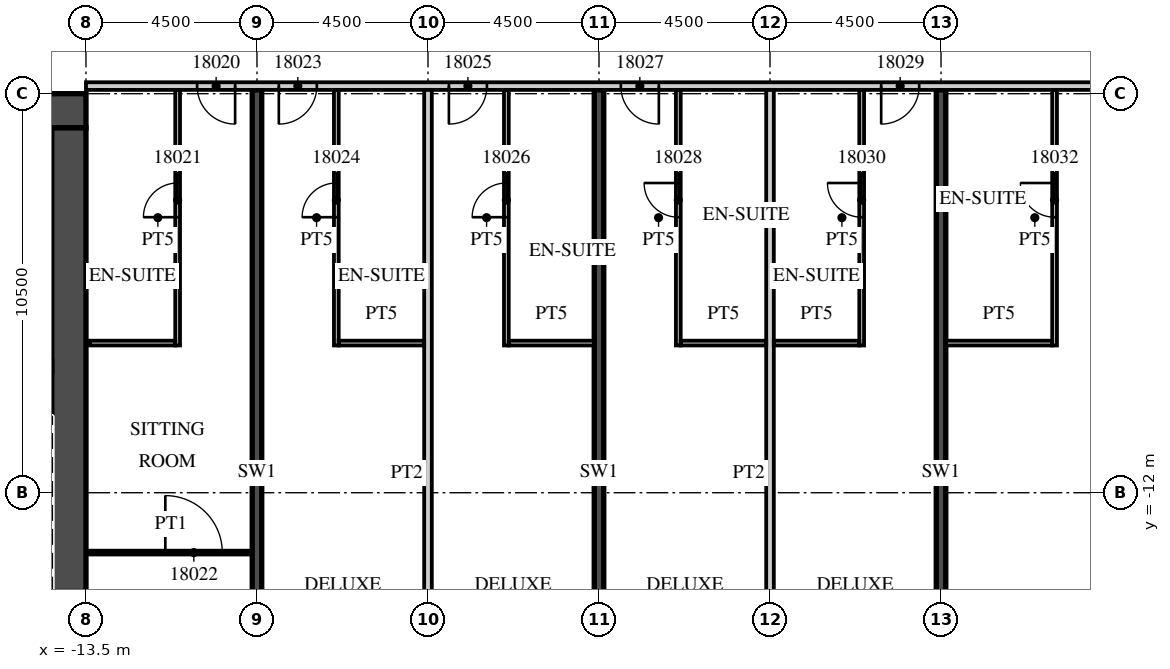
"""IFC4 building model, lengths in metres.
Left out: names, types, materials, properties, quantities, classifications, styles, units other than length and angle.
Written with IfcOpenShell. Run it as: python <this file> out.ifc"""

import sys

from ifc_helpers import new_model, si_unit, direction, frame, frame_2d, origin, place, context, subcontext, project, spatial, rectangle, extrude, element, fill, save


model = new_model("IFC4")
c1 = context("Model", 3, precision=1e-05, world=origin(), true_north=direction((0.0, 1.0)))
c2 = subcontext(c1, "Body", "Model", "MODEL_VIEW")
j1 = project(units=[si_unit("LENGTHUNIT", "METRE"), si_unit("PLANEANGLEUNIT", "RADIAN")], contexts=[c1])
p1 = place(None, origin())
s1 = spatial("IfcSite", under=j1, at=p1, CompositionType="ELEMENT")
p2 = place(p1, origin())
s2 = spatial("IfcBuilding", under=s1, at=p2, CompositionType="ELEMENT")
p3 = place(p2, frame((0.0, 0.0, 89.7)))
s3 = spatial("IfcBuildingStorey", under=s2, at=p3, CompositionType="ELEMENT", Elevation=89.7)
for number, where, z_axis, x_axis in (
    (1, (-9.0, -21.54, 0.0), (0.0, 0.0, 1.0), (0.0, 1.0, 0.0)),
    (2, (0.0, -21.54, 0.0), (0.0, 0.0, 1.0), (0.0, 1.0, 0.0)),
    (3, (9.0, -21.54, 0.0), (0.0, 0.0, 1.0), (0.0, 1.0, 0.0)),
):
    element("IfcWall", number, at=place(p3, frame(where, z_axis=z_axis, x_axis=x_axis)), inside=s3, PredefinedType="SHEAR", context=c2, shape_type="SweptSolid", body=[
        extrude(rectangle(XDim=20.14, YDim=0.25, at=frame_2d((10.07, 0.0))), origin(), (0.0, 0.0, 1.0), 3.3),
    ])
p4 = place(p3, frame((-13.5, -1.3, 0.0), z_axis=(0.0, 0.0, 1.0), x_axis=(1.0, 0.0, 0.0)))
e4 = element("IfcWall", 4, at=p4, inside=s3, PredefinedType="PARTITIONING", context=c2, shape_type="SweptSolid", body=[
    extrude(rectangle(XDim=58.05, YDim=0.2, at=frame_2d((29.025, 0.0))), origin(), (0.0, 0.0, 1.0), 3.02),
])
p5 = place(p4, frame((2.925, 0.0, 0.0)))
e5 = element("IfcOpeningElement", 5, at=p5, cuts=e4, PredefinedType="OPENING", context=c2, shape_type="SweptSolid", body=[
    extrude(rectangle(XDim=1.0, YDim=2.1, at=frame_2d((0.5, 1.05))), frame((0.0, 0.11, 0.0), z_axis=(0.0, -1.0, 0.0), x_axis=(1.0, 0.0, 0.0)), (0.0, 0.0, 1.0), 0.22),
])
p6 = place(p4, frame((5.075, 0.0, 0.0)))
e6 = element("IfcOpeningElement", 6, at=p6, cuts=e4, PredefinedType="OPENING", context=c2, shape_type="SweptSolid", body=[
    extrude(rectangle(XDim=1.0, YDim=2.1, at=frame_2d((0.5, 1.05))), frame((0.0, 0.11, 0.0), z_axis=(0.0, -1.0, 0.0), x_axis=(1.0, 0.0, 0.0)), (0.0, 0.0, 1.0), 0.22),
])
p7 = place(p4, frame((9.55, 0.0, 0.0)))
e7 = element("IfcOpeningElement", 7, at=p7, cuts=e4, PredefinedType="OPENING", context=c2, shape_type="SweptSolid", body=[
    extrude(rectangle(XDim=1.0, YDim=2.1, at=frame_2d((0.5, 1.05))), frame((0.0, 0.11, 0.0), z_axis=(0.0, -1.0, 0.0), x_axis=(1.0, 0.0, 0.0)), (0.0, 0.0, 1.0), 0.22),
])
p8 = place(p4, frame((14.075, 0.0, 0.0)))
e8 = element("IfcOpeningElement", 8, at=p8, cuts=e4, PredefinedType="OPENING", context=c2, shape_type="SweptSolid", body=[
    extrude(rectangle(XDim=1.0, YDim=2.1, at=frame_2d((0.5, 1.05))), frame((0.0, 0.11, 0.0), z_axis=(0.0, -1.0, 0.0), x_axis=(1.0, 0.0, 0.0)), (0.0, 0.0, 1.0), 0.22),
])
p9 = place(p4, frame((20.925, 0.0, 0.0)))
e9 = element("IfcOpeningElement", 9, at=p9, cuts=e4, PredefinedType="OPENING", context=c2, shape_type="SweptSolid", body=[
    extrude(rectangle(XDim=1.0, YDim=2.1, at=frame_2d((0.5, 1.05))), frame((0.0, 0.11, 0.0), z_axis=(0.0, -1.0, 0.0), x_axis=(1.0, 0.0, 0.0)), (0.0, 0.0, 1.0), 0.22),
])
p10 = place(p4, frame((27.862, 0.0, 0.0)))
e10 = element("IfcOpeningElement", 10, at=p10, cuts=e4, PredefinedType="OPENING", context=c2, shape_type="SweptSolid", body=[
    extrude(rectangle(XDim=1.2, YDim=2.1, at=frame_2d((0.6, 1.05))), frame((0.0, 0.11, 0.0), z_axis=(0.0, -1.0, 0.0), x_axis=(1.0, 0.0, 0.0)), (0.0, 0.0, 1.0), 0.22),
])
p11 = place(p4, frame((34.45, 0.0, 0.0)))
e11 = element("IfcOpeningElement", 11, at=p11, cuts=e4, PredefinedType="OPENING", context=c2, shape_type="SweptSolid", body=[
    extrude(rectangle(XDim=1.0, YDim=2.1, at=frame_2d((0.5, 1.05))), frame((0.0, 0.11, 0.0), z_axis=(0.0, -1.0, 0.0), x_axis=(1.0, 0.0, 0.0)), (0.0, 0.0, 1.0), 0.22),
])
p12 = place(p4, frame((38.925, 0.0, 0.0)))
e12 = element("IfcOpeningElement", 12, at=p12, cuts=e4, PredefinedType="OPENING", context=c2, shape_type="SweptSolid", body=[
    extrude(rectangle(XDim=1.0, YDim=2.1, at=frame_2d((0.5, 1.05))), frame((0.0, 0.11, 0.0), z_axis=(0.0, -1.0, 0.0), x_axis=(1.0, 0.0, 0.0)), (0.0, 0.0, 1.0), 0.22),
])
p13 = place(p4, frame((41.075, 0.0, 0.0)))
e13 = element("IfcOpeningElement", 13, at=p13, cuts=e4, PredefinedType="OPENING", context=c2, shape_type="SweptSolid", body=[
    extrude(rectangle(XDim=1.0, YDim=2.1, at=frame_2d((0.5, 1.05))), frame((0.0, 0.11, 0.0), z_axis=(0.0, -1.0, 0.0), x_axis=(1.0, 0.0, 0.0)), (0.0, 0.0, 1.0), 0.22),
])
p14 = place(p4, frame((45.55, 0.0, 0.0)))
e14 = element("IfcOpeningElement", 14, at=p14, cuts=e4, PredefinedType="OPENING", context=c2, shape_type="SweptSolid", body=[
    extrude(rectangle(XDim=1.0, YDim=2.1, at=frame_2d((0.5, 1.05))), frame((0.0, 0.11, 0.0), z_axis=(0.0, -1.0, 0.0), x_axis=(1.0, 0.0, 0.0)), (0.0, 0.0, 1.0), 0.22),
])
p15 = place(p4, frame((50.075, 0.0, 0.0)))
e15 = element("IfcOpeningElement", 15, at=p15, cuts=e4, PredefinedType="OPENING", context=c2, shape_type="SweptSolid", body=[
    extrude(rectangle(XDim=1.0, YDim=2.1, at=frame_2d((0.5, 1.05))), frame((0.0, 0.11, 0.0), z_axis=(0.0, -1.0, 0.0), x_axis=(1.0, 0.0, 0.0)), (0.0, 0.0, 1.0), 0.22),
])
p16 = place(p4, frame((56.525, 0.0, 0.0)))
e16 = element("IfcOpeningElement", 16, at=p16, cuts=e4, PredefinedType="OPENING", context=c2, shape_type="SweptSolid", body=[
    extrude(rectangle(XDim=1.0, YDim=2.1, at=frame_2d((0.5, 1.05))), frame((0.0, 0.11, 0.0), z_axis=(0.0, -1.0, 0.0), x_axis=(1.0, 0.0, 0.0)), (0.0, 0.0, 1.0), 0.22),
])
p17 = place(p3, frame((-11.088, -8.125, 0.0), z_axis=(0.0, 0.0, 1.0), x_axis=(0.0, 1.0, 0.0)))
e17 = element("IfcWall", 17, at=p17, inside=s3, PredefinedType="PARTITIONING", context=c2, shape_type="SweptSolid", body=[
    extrude(rectangle(XDim=6.725, YDim=0.125, at=frame_2d((3.363, 0.0))), origin(), (0.0, 0.0, 1.0), 3.02),
])
p18 = place(p17, frame((3.375, 0.0, 0.0)))
e18 = element("IfcOpeningElement", 18, at=p18, cuts=e17, PredefinedType="OPENING", context=c2, shape_type="SweptSolid", body=[
    extrude(rectangle(XDim=0.9, YDim=2.1, at=frame_2d((0.45, 1.05))), frame((0.0, 0.073, 0.0), z_axis=(0.0, -1.0, 0.0), x_axis=(1.0, 0.0, 0.0)), (0.0, 0.0, 1.0), 0.145),
])
p19 = place(p3, frame((-13.4, -8.062, 0.0), z_axis=(0.0, 0.0, 1.0), x_axis=(1.0, 0.0, 0.0)))
e19 = element("IfcWall", 19, at=p19, inside=s3, PredefinedType="PARTITIONING", context=c2, shape_type="SweptSolid", body=[
    extrude(rectangle(XDim=2.25, YDim=0.125, at=frame_2d((1.125, 0.0))), origin(), (0.0, 0.0, 1.0), 3.02),
])
p20 = place(p3, frame((-13.4, -13.575, 0.0), z_axis=(0.0, 0.0, 1.0), x_axis=(1.0, 0.0, 0.0)))
e20 = element("IfcWall", 20, at=p20, inside=s3, PredefinedType="PARTITIONING", context=c2, shape_type="SweptSolid", body=[
    extrude(rectangle(XDim=4.275, YDim=0.1, at=frame_2d((2.137, 0.0))), origin(), (0.0, 0.0, 1.0), 3.02),
])
p21 = place(p20, frame((1.988, 0.0, 0.0)))
e21 = element("IfcOpeningElement", 21, at=p21, cuts=e20, PredefinedType="OPENING", context=c2, shape_type="SweptSolid", body=[
    extrude(rectangle(XDim=1.5, YDim=2.1, at=frame_2d((0.75, 1.05))), frame((0.0, 0.06, 0.0), z_axis=(0.0, -1.0, 0.0), x_axis=(1.0, 0.0, 0.0)), (0.0, 0.0, 1.0), 0.12),
])
p22 = place(p3, frame((-4.5, -21.55, 0.0), z_axis=(0.0, 0.0, 1.0), x_axis=(0.0, 1.0, 0.0)))
e22 = element("IfcWall", 22, at=p22, inside=s3, PredefinedType="PARTITIONING", context=c2, shape_type="SweptSolid", body=[
    extrude(rectangle(XDim=20.15, YDim=0.2, at=frame_2d((10.075, 0.0))), origin(), (0.0, 0.0, 1.0), 3.02),
])
p23 = place(p3, frame((-6.912, -8.125, 0.0), z_axis=(0.0, 0.0, 1.0), x_axis=(0.0, 1.0, 0.0)))
e23 = element("IfcWall", 23, at=p23, inside=s3, PredefinedType="PARTITIONING", context=c2, shape_type="SweptSolid", body=[
    extrude(rectangle(XDim=6.725, YDim=0.125, at=frame_2d((3.363, 0.0))), origin(), (0.0, 0.0, 1.0), 3.02),
])
p24 = place(p23, frame((3.375, 0.0, 0.0)))
e24 = element("IfcOpeningElement", 24, at=p24, cuts=e23, PredefinedType="OPENING", context=c2, shape_type="SweptSolid", body=[
    extrude(rectangle(XDim=0.9, YDim=2.1, at=frame_2d((0.45, 1.05))), frame((0.0, 0.073, 0.0), z_axis=(0.0, -1.0, 0.0), x_axis=(1.0, 0.0, 0.0)), (0.0, 0.0, 1.0), 0.145),
])
p25 = place(p3, frame((-6.85, -8.062, 0.0), z_axis=(0.0, 0.0, 1.0), x_axis=(1.0, 0.0, 0.0)))
e25 = element("IfcWall", 25, at=p25, inside=s3, PredefinedType="PARTITIONING", context=c2, shape_type="SweptSolid", body=[
    extrude(rectangle(XDim=2.25, YDim=0.125, at=frame_2d((1.125, 0.0))), origin(), (0.0, 0.0, 1.0), 3.02),
])
p26 = place(p3, frame((-2.438, -8.125, 0.0), z_axis=(0.0, 0.0, 1.0), x_axis=(0.0, 1.0, 0.0)))
e26 = element("IfcWall", 26, at=p26, inside=s3, PredefinedType="PARTITIONING", context=c2, shape_type="SweptSolid", body=[
    extrude(rectangle(XDim=6.725, YDim=0.125, at=frame_2d((3.363, 0.0))), origin(), (0.0, 0.0, 1.0), 3.02),
])
p27 = place(p26, frame((3.375, 0.0, 0.0)))
e27 = element("IfcOpeningElement", 27, at=p27, cuts=e26, PredefinedType="OPENING", context=c2, shape_type="SweptSolid", body=[
    extrude(rectangle(XDim=0.9, YDim=2.1, at=frame_2d((0.45, 1.05))), frame((0.0, 0.073, 0.0), z_axis=(0.0, -1.0, 0.0), x_axis=(1.0, 0.0, 0.0)), (0.0, 0.0, 1.0), 0.145),
])
p28 = place(p3, frame((-2.375, -8.062, 0.0), z_axis=(0.0, 0.0, 1.0), x_axis=(1.0, 0.0, 0.0)))
e28 = element("IfcWall", 28, at=p28, inside=s3, PredefinedType="PARTITIONING", context=c2, shape_type="SweptSolid", body=[
    extrude(rectangle(XDim=2.25, YDim=0.125, at=frame_2d((1.125, 0.0))), origin(), (0.0, 0.0, 1.0), 3.02),
])
p29 = place(p3, frame((4.5, -21.55, 0.0), z_axis=(0.0, 0.0, 1.0), x_axis=(0.0, 1.0, 0.0)))
e29 = element("IfcWall", 29, at=p29, inside=s3, PredefinedType="PARTITIONING", context=c2, shape_type="SweptSolid", body=[
    extrude(rectangle(XDim=20.15, YDim=0.2, at=frame_2d((10.075, 0.0))), origin(), (0.0, 0.0, 1.0), 3.02),
])
p30 = place(p3, frame((2.087, -8.125, 0.0), z_axis=(0.0, 0.0, 1.0), x_axis=(0.0, 1.0, 0.0)))
e30 = element("IfcWall", 30, at=p30, inside=s3, PredefinedType="PARTITIONING", context=c2, shape_type="SweptSolid", body=[
    extrude(rectangle(XDim=6.725, YDim=0.125, at=frame_2d((3.363, 0.0))), origin(), (0.0, 0.0, 1.0), 3.02),
])
p31 = place(p30, frame((3.375, 0.0, 0.0)))
e31 = element("IfcOpeningElement", 31, at=p31, cuts=e30, PredefinedType="OPENING", context=c2, shape_type="SweptSolid", body=[
    extrude(rectangle(XDim=0.9, YDim=2.1, at=frame_2d((0.45, 1.05))), frame((0.0, 0.073, 0.0), z_axis=(0.0, -1.0, 0.0), x_axis=(1.0, 0.0, 0.0)), (0.0, 0.0, 1.0), 0.145),
])
p32 = place(p3, frame((2.15, -8.062, 0.0), z_axis=(0.0, 0.0, 1.0), x_axis=(1.0, 0.0, 0.0)))
e32 = element("IfcWall", 32, at=p32, inside=s3, PredefinedType="PARTITIONING", context=c2, shape_type="SweptSolid", body=[
    extrude(rectangle(XDim=2.25, YDim=0.125, at=frame_2d((1.125, 0.0))), origin(), (0.0, 0.0, 1.0), 3.02),
])
p33 = place(p3, frame((6.912, -8.125, 0.0), z_axis=(0.0, 0.0, 1.0), x_axis=(0.0, 1.0, 0.0)))
e33 = element("IfcWall", 33, at=p33, inside=s3, PredefinedType="PARTITIONING", context=c2, shape_type="SweptSolid", body=[
    extrude(rectangle(XDim=6.725, YDim=0.125, at=frame_2d((3.363, 0.0))), origin(), (0.0, 0.0, 1.0), 3.02),
])
p34 = place(p33, frame((3.375, 0.0, 0.0)))
e34 = element("IfcOpeningElement", 34, at=p34, cuts=e33, PredefinedType="OPENING", context=c2, shape_type="SweptSolid", body=[
    extrude(rectangle(XDim=0.9, YDim=2.1, at=frame_2d((0.45, 1.05))), frame((0.0, 0.073, 0.0), z_axis=(0.0, -1.0, 0.0), x_axis=(1.0, 0.0, 0.0)), (0.0, 0.0, 1.0), 0.145),
])
p35 = place(p3, frame((4.6, -8.062, 0.0), z_axis=(0.0, 0.0, 1.0), x_axis=(1.0, 0.0, 0.0)))
e35 = element("IfcWall", 35, at=p35, inside=s3, PredefinedType="PARTITIONING", context=c2, shape_type="SweptSolid", body=[
    extrude(rectangle(XDim=2.25, YDim=0.125, at=frame_2d((1.125, 0.0))), origin(), (0.0, 0.0, 1.0), 3.02),
])
p36 = place(p3, frame((11.988, -8.125, 0.0), z_axis=(0.0, 0.0, 1.0), x_axis=(0.0, 1.0, 0.0)))
e36 = element("IfcWall", 36, at=p36, inside=s3, PredefinedType="PARTITIONING", context=c2, shape_type="SweptSolid", body=[
    extrude(rectangle(XDim=6.725, YDim=0.125, at=frame_2d((3.363, 0.0))), origin(), (0.0, 0.0, 1.0), 3.02),
])
p37 = place(p36, frame((3.375, 0.0, 0.0)))
e37 = element("IfcOpeningElement", 37, at=p37, cuts=e36, PredefinedType="OPENING", context=c2, shape_type="SweptSolid", body=[
    extrude(rectangle(XDim=0.9, YDim=2.1, at=frame_2d((0.45, 1.05))), frame((0.0, 0.073, 0.0), z_axis=(0.0, -1.0, 0.0), x_axis=(1.0, 0.0, 0.0)), (0.0, 0.0, 1.0), 0.145),
])
p38 = place(p3, frame((9.125, -8.062, 0.0), z_axis=(0.0, 0.0, 1.0), x_axis=(1.0, 0.0, 0.0)))
e38 = element("IfcWall", 38, at=p38, inside=s3, PredefinedType="PARTITIONING", context=c2, shape_type="SweptSolid", body=[
    extrude(rectangle(XDim=2.8, YDim=0.125, at=frame_2d((1.4, 0.0))), origin(), (0.0, 0.0, 1.0), 3.02),
])
p39 = place(p3, frame((-31.5, -1.95, 0.0), z_axis=(0.0, 0.0, 1.0), x_axis=(1.0, 0.0, 0.0)))
e39 = element("IfcWall", 39, at=p39, inside=s3, PredefinedType="SHEAR", context=c2, shape_type="SweptSolid", body=[
    extrude(rectangle(XDim=18.0, YDim=0.9, at=frame_2d((9.0, 0.0))), origin(), (0.0, 0.0, 1.0), 3.02),
])
p40 = place(p39, frame((14.725, 0.0, 0.0)))
e40 = element("IfcOpeningElement", 40, at=p40, cuts=e39, PredefinedType="OPENING", context=c2, shape_type="SweptSolid", body=[
    extrude(rectangle(XDim=1.8, YDim=2.1, at=frame_2d((0.9, 1.05))), frame((0.0, 0.46, 0.0), z_axis=(0.0, -1.0, 0.0), x_axis=(1.0, 0.0, 0.0)), (0.0, 0.0, 1.0), 0.92),
])
p41 = place(p3, frame((-13.95, -14.6, 0.0), z_axis=(0.0, 0.0, 1.0), x_axis=(0.0, 1.0, 0.0)))
e41 = element("IfcWall", 41, at=p41, inside=s3, PredefinedType="SHEAR", context=c2, shape_type="SweptSolid", body=[
    extrude(rectangle(XDim=12.2, YDim=0.9, at=frame_2d((6.1, 0.0))), origin(), (0.0, 0.0, 1.0), 3.02),
])
p42 = place(p5, origin())
e42 = element("IfcDoor", 42, at=p42, inside=s3, OperationType="SINGLE_SWING_RIGHT", PredefinedType="DOOR", context=c2, shape_type="SweptSolid", body=[
    extrude(rectangle(XDim=1.0, YDim=2.1, at=frame_2d((0.5, 1.05))), frame((0.0, 0.025, 0.0), z_axis=(0.0, -1.0, 0.0), x_axis=(1.0, 0.0, 0.0)), (0.0, 0.0, 1.0), 0.05),
])
fill(e5, e42)
p43 = place(p18, origin())
e43 = element("IfcDoor", 43, at=p43, inside=s3, OperationType="SINGLE_SWING_LEFT", PredefinedType="DOOR", context=c2, shape_type="SweptSolid", body=[
    extrude(rectangle(XDim=0.9, YDim=2.1, at=frame_2d((0.45, 1.05))), frame((0.0, 0.025, 0.0), z_axis=(0.0, -1.0, 0.0), x_axis=(1.0, 0.0, 0.0)), (0.0, 0.0, 1.0), 0.05),
])
fill(e18, e43)
p44 = place(p21, origin())
e44 = element("IfcDoor", 44, at=p44, inside=s3, OperationType="SINGLE_SWING_LEFT", PredefinedType="DOOR", context=c2, shape_type="SweptSolid", body=[
    extrude(rectangle(XDim=1.5, YDim=2.1, at=frame_2d((0.75, 1.05))), frame((0.0, 0.025, 0.0), z_axis=(0.0, -1.0, 0.0), x_axis=(1.0, 0.0, 0.0)), (0.0, 0.0, 1.0), 0.05),
])
fill(e21, e44)
p45 = place(p6, origin())
e45 = element("IfcDoor", 45, at=p45, inside=s3, OperationType="SINGLE_SWING_LEFT", PredefinedType="DOOR", context=c2, shape_type="SweptSolid", body=[
    extrude(rectangle(XDim=1.0, YDim=2.1, at=frame_2d((0.5, 1.05))), frame((0.0, 0.025, 0.0), z_axis=(0.0, -1.0, 0.0), x_axis=(1.0, 0.0, 0.0)), (0.0, 0.0, 1.0), 0.05),
])
fill(e6, e45)
p46 = place(p24, origin())
e46 = element("IfcDoor", 46, at=p46, inside=s3, OperationType="SINGLE_SWING_LEFT", PredefinedType="DOOR", context=c2, shape_type="SweptSolid", body=[
    extrude(rectangle(XDim=0.9, YDim=2.1, at=frame_2d((0.45, 1.05))), frame((0.0, 0.025, 0.0), z_axis=(0.0, -1.0, 0.0), x_axis=(1.0, 0.0, 0.0)), (0.0, 0.0, 1.0), 0.05),
])
fill(e24, e46)
p47 = place(p7, origin())
e47 = element("IfcDoor", 47, at=p47, inside=s3, OperationType="SINGLE_SWING_LEFT", PredefinedType="DOOR", context=c2, shape_type="SweptSolid", body=[
    extrude(rectangle(XDim=1.0, YDim=2.1, at=frame_2d((0.5, 1.05))), frame((0.0, 0.025, 0.0), z_axis=(0.0, -1.0, 0.0), x_axis=(1.0, 0.0, 0.0)), (0.0, 0.0, 1.0), 0.05),
])
fill(e7, e47)
p48 = place(p27, origin())
e48 = element("IfcDoor", 48, at=p48, inside=s3, OperationType="SINGLE_SWING_LEFT", PredefinedType="DOOR", context=c2, shape_type="SweptSolid", body=[
    extrude(rectangle(XDim=0.9, YDim=2.1, at=frame_2d((0.45, 1.05))), frame((0.0, 0.025, 0.0), z_axis=(0.0, -1.0, 0.0), x_axis=(1.0, 0.0, 0.0)), (0.0, 0.0, 1.0), 0.05),
])
fill(e27, e48)
p49 = place(p8, origin())
e49 = element("IfcDoor", 49, at=p49, inside=s3, OperationType="SINGLE_SWING_RIGHT", PredefinedType="DOOR", context=c2, shape_type="SweptSolid", body=[
    extrude(rectangle(XDim=1.0, YDim=2.1, at=frame_2d((0.5, 1.05))), frame((0.0, 0.025, 0.0), z_axis=(0.0, -1.0, 0.0), x_axis=(1.0, 0.0, 0.0)), (0.0, 0.0, 1.0), 0.05),
])
fill(e8, e49)
p50 = place(p31, origin())
e50 = element("IfcDoor", 50, at=p50, inside=s3, OperationType="SINGLE_SWING_RIGHT", PredefinedType="DOOR", context=c2, shape_type="SweptSolid", body=[
    extrude(rectangle(XDim=0.9, YDim=2.1, at=frame_2d((0.45, 1.05))), frame((0.0, 0.025, 0.0), z_axis=(0.0, -1.0, 0.0), x_axis=(1.0, 0.0, 0.0)), (0.0, 0.0, 1.0), 0.05),
])
fill(e31, e50)
p51 = place(p9, origin())
e51 = element("IfcDoor", 51, at=p51, inside=s3, OperationType="SINGLE_SWING_LEFT", PredefinedType="DOOR", context=c2, shape_type="SweptSolid", body=[
    extrude(rectangle(XDim=1.0, YDim=2.1, at=frame_2d((0.5, 1.05))), frame((0.0, 0.025, 0.0), z_axis=(0.0, -1.0, 0.0), x_axis=(1.0, 0.0, 0.0)), (0.0, 0.0, 1.0), 0.05),
])
fill(e9, e51)
p52 = place(p34, origin())
e52 = element("IfcDoor", 52, at=p52, inside=s3, OperationType="SINGLE_SWING_RIGHT", PredefinedType="DOOR", context=c2, shape_type="SweptSolid", body=[
    extrude(rectangle(XDim=0.9, YDim=2.1, at=frame_2d((0.45, 1.05))), frame((0.0, 0.025, 0.0), z_axis=(0.0, -1.0, 0.0), x_axis=(1.0, 0.0, 0.0)), (0.0, 0.0, 1.0), 0.05),
])
fill(e34, e52)
p53 = place(p37, origin())
e53 = element("IfcDoor", 53, at=p53, inside=s3, OperationType="SINGLE_SWING_RIGHT", PredefinedType="DOOR", context=c2, shape_type="SweptSolid", body=[
    extrude(rectangle(XDim=0.9, YDim=2.1, at=frame_2d((0.45, 1.05))), frame((0.0, 0.025, 0.0), z_axis=(0.0, -1.0, 0.0), x_axis=(1.0, 0.0, 0.0)), (0.0, 0.0, 1.0), 0.05),
])
fill(e37, e53)
save(model, sys.argv[1])
